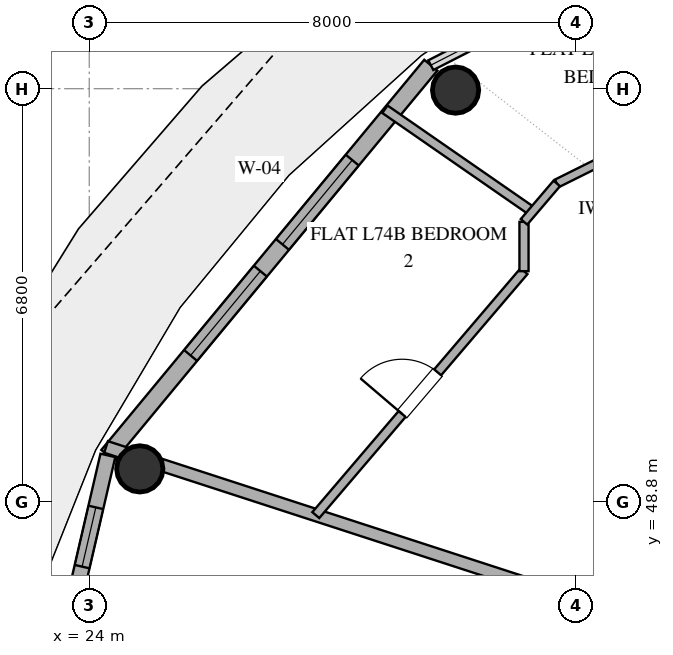
"""IFC4 building model, lengths in metres.
Left out: names, types, materials, properties, quantities, classifications, styles, units other than length and angle.
Written with IfcOpenShell. Run it as: python <this file> out.ifc"""

import sys

from ifc_helpers import new_model, si_unit, direction, frame, frame_2d, origin, origin_2d, place, context, subcontext, project, spatial, rectangle, hollow_circle, extrude, element, fill, save


model = new_model("IFC4")
c1 = context("Model", 3, precision=1e-05, world=origin(), true_north=direction((0.0, 1.0)))
c2 = subcontext(c1, "Body", "Model", "MODEL_VIEW")
j1 = project(units=[si_unit("LENGTHUNIT", "METRE"), si_unit("PLANEANGLEUNIT", "RADIAN")], contexts=[c1])
p1 = place(None, origin())
s1 = spatial("IfcSite", under=j1, at=p1, CompositionType="ELEMENT")
p2 = place(p1, origin())
s2 = spatial("IfcBuilding", under=s1, at=p2, CompositionType="ELEMENT")
p3 = place(p2, frame((0.0, 0.0, 287.4)))
s3 = spatial("IfcBuildingStorey", under=s2, at=p3, CompositionType="ELEMENT", Elevation=287.4)
for number, where, z_axis, x_axis in (
    (1, (30.025, 55.576, 0.0), (0.0, 0.0, 1.0), (1.0, 0.0, 0.0)),
    (2, (24.831, 49.347, 0.0), (0.0, 0.0, 1.0), (1.0, 0.0, 0.0)),
):
    element("IfcColumn", number, at=place(p3, frame(where, z_axis=z_axis, x_axis=x_axis)), inside=s3, PredefinedType="COLUMN", context=c2, shape_type="SweptSolid", body=[
        extrude(hollow_circle(Radius=0.381, WallThickness=0.025, at=origin_2d()), origin(), (0.0, 0.0, 1.0), 3.37),
    ])
p4 = place(p3, frame((29.617, 55.987, 0.0), z_axis=(0.0, 0.0, 1.0), x_axis=(-0.63761509934, -0.770355103243, 0.0)))
e3 = element("IfcWall", 3, at=p4, inside=s3, PredefinedType="SOLIDWALL", context=c2, shape_type="SweptSolid", body=[
    extrude(rectangle(XDim=8.33, YDim=0.28, at=frame_2d((4.165, 0.0))), origin(), (0.0, 0.0, 1.0), 3.37),
])
p5 = place(p4, frame((2.026, 0.0, 0.85)))
e4 = element("IfcOpeningElement", 4, at=p5, cuts=e3, PredefinedType="OPENING", context=c2, shape_type="SweptSolid", body=[
    extrude(rectangle(XDim=1.8, YDim=2.2, at=frame_2d((0.9, 1.1))), frame((0.0, 0.15, 0.0), z_axis=(0.0, -1.0, 0.0), x_axis=(1.0, 0.0, 0.0)), (0.0, 0.0, 1.0), 0.3),
])
p6 = place(p4, frame((4.396, 0.0, 0.85)))
e5 = element("IfcOpeningElement", 5, at=p6, cuts=e3, PredefinedType="OPENING", context=c2, shape_type="SweptSolid", body=[
    extrude(rectangle(XDim=1.8, YDim=2.2, at=frame_2d((0.9, 1.1))), frame((0.0, 0.15, 0.0), z_axis=(0.0, -1.0, 0.0), x_axis=(1.0, 0.0, 0.0)), (0.0, 0.0, 1.0), 0.3),
])
p7 = place(p3, frame((24.306, 49.57, 0.0), z_axis=(0.0, 0.0, 1.0), x_axis=(-0.225635078214, -0.974211892495, 0.0)))
e6 = element("IfcWall", 6, at=p7, inside=s3, PredefinedType="SOLIDWALL", context=c2, shape_type="SweptSolid", body=[
    extrude(rectangle(XDim=7.77, YDim=0.25, at=frame_2d((3.885, 0.0))), origin(), (0.0, 0.0, 1.0), 3.37),
])
p8 = place(p7, frame((0.878, 0.0, 1.42)))
e7 = element("IfcOpeningElement", 7, at=p8, cuts=e6, PredefinedType="OPENING", context=c2, shape_type="SweptSolid", body=[
    extrude(rectangle(XDim=1.0, YDim=1.05, at=frame_2d((0.5, 0.525))), frame((0.0, 0.135, 0.0), z_axis=(0.0, -1.0, 0.0), x_axis=(1.0, 0.0, 0.0)), (0.0, 0.0, 1.0), 0.27),
])
p9 = place(p3, frame((24.276, 49.708, 0.0), z_axis=(0.0, 0.0, 1.0), x_axis=(0.951054334328, -0.309023709699, 0.0)))
e8 = element("IfcWall", 8, at=p9, inside=s3, PredefinedType="PARTITIONING", context=c2, shape_type="SweptSolid", body=[
    extrude(rectangle(XDim=11.065, YDim=0.2, at=frame_2d((5.533, 0.0))), origin(), (0.0, 0.0, 1.0), 2.73),
])
p10 = place(p3, frame((27.726, 48.587, 0.0), z_axis=(0.0, 0.0, 1.0), x_axis=(0.649196412447, 0.760620810961, 0.0)))
e9 = element("IfcWall", 9, at=p10, inside=s3, PredefinedType="PARTITIONING", context=c2, shape_type="SweptSolid", body=[
    extrude(rectangle(XDim=5.274, YDim=0.15, at=frame_2d((2.637, 0.0))), origin(), (0.0, 0.0, 1.0), 2.73),
])
p11 = place(p10, frame((2.187, 0.0, 0.0)))
e10 = element("IfcOpeningElement", 10, at=p11, cuts=e9, PredefinedType="OPENING", context=c2, shape_type="SweptSolid", body=[
    extrude(rectangle(XDim=0.9, YDim=2.1, at=frame_2d((0.45, 1.05))), frame((0.0, 0.085, 0.0), z_axis=(0.0, -1.0, 0.0), x_axis=(1.0, 0.0, 0.0)), (0.0, 0.0, 1.0), 0.17),
])
p12 = place(p3, frame((31.293, 53.578, 0.0), z_axis=(0.0, 0.0, 1.0), x_axis=(-0.821957300328, 0.569549116792, 0.0)))
e11 = element("IfcWall", 11, at=p12, inside=s3, PredefinedType="PARTITIONING", context=c2, shape_type="SweptSolid", body=[
    extrude(rectangle(XDim=2.957, YDim=0.15, at=frame_2d((1.479, 0.0))), origin(), (0.0, 0.0, 1.0), 2.73),
])
p13 = place(p3, frame((32.711, 54.55, 0.0), z_axis=(0.0, 0.0, 1.0), x_axis=(-0.895409226325, -0.445244109912, 0.0)))
e12 = element("IfcWall", 12, at=p13, inside=s3, PredefinedType="PARTITIONING", context=c2, shape_type="SweptSolid", body=[
    extrude(rectangle(XDim=1.141, YDim=0.14, at=frame_2d((0.571, 0.0))), origin(), (0.0, 0.0, 1.0), 2.73),
])
p14 = place(p3, frame((31.15, 52.599, 0.0), z_axis=(0.0, 0.0, 1.0), x_axis=(0.0, 1.0, 0.0)))
e13 = element("IfcWall", 13, at=p14, inside=s3, PredefinedType="PARTITIONING", context=c2, shape_type="SweptSolid", body=[
    extrude(rectangle(XDim=0.812, YDim=0.15, at=frame_2d((0.406, 0.0))), origin(), (0.0, 0.0, 1.0), 2.73),
])
p15 = place(p3, frame((31.689, 54.042, 0.0), z_axis=(0.0, 0.0, 1.0), x_axis=(-0.649191857323, -0.760624698774, 0.0)))
e14 = element("IfcWall", 14, at=p15, inside=s3, PredefinedType="PARTITIONING", context=c2, shape_type="SweptSolid", body=[
    extrude(rectangle(XDim=0.83, YDim=0.14, at=frame_2d((0.415, 0.0))), origin(), (0.0, 0.0, 1.0), 2.73),
])
p16 = place(p5, origin())
e15 = element("IfcWindow", 15, at=p16, inside=s3, PartitioningType="SINGLE_PANEL", PredefinedType="WINDOW", context=c2, shape_type="SweptSolid", body=[
    extrude(rectangle(XDim=1.8, YDim=2.2, at=frame_2d((0.9, 1.1))), frame((0.0, 0.03, 0.0), z_axis=(0.0, -1.0, 0.0), x_axis=(1.0, 0.0, 0.0)), (0.0, 0.0, 1.0), 0.06),
])
fill(e4, e15)
p17 = place(p6, origin())
e16 = element("IfcWindow", 16, at=p17, inside=s3, PartitioningType="SINGLE_PANEL", PredefinedType="WINDOW", context=c2, shape_type="SweptSolid", body=[
    extrude(rectangle(XDim=1.8, YDim=2.2, at=frame_2d((0.9, 1.1))), frame((0.0, 0.03, 0.0), z_axis=(0.0, -1.0, 0.0), x_axis=(1.0, 0.0, 0.0)), (0.0, 0.0, 1.0), 0.06),
])
fill(e5, e16)
p18 = place(p8, origin())
e17 = element("IfcWindow", 17, at=p18, inside=s3, PartitioningType="SINGLE_PANEL", PredefinedType="WINDOW", context=c2, shape_type="SweptSolid", body=[
    extrude(rectangle(XDim=1.0, YDim=1.05, at=frame_2d((0.5, 0.525))), frame((0.0, 0.03, 0.0), z_axis=(0.0, -1.0, 0.0), x_axis=(1.0, 0.0, 0.0)), (0.0, 0.0, 1.0), 0.06),
])
fill(e7, e17)
p19 = place(p11, origin())
e18 = element("IfcDoor", 18, at=p19, inside=s3, OperationType="SINGLE_SWING_LEFT", PredefinedType="DOOR", context=c2, shape_type="SweptSolid", body=[
    extrude(rectangle(XDim=0.9, YDim=2.1, at=frame_2d((0.45, 1.05))), frame((0.0, 0.025, 0.0), z_axis=(0.0, -1.0, 0.0), x_axis=(1.0, 0.0, 0.0)), (0.0, 0.0, 1.0), 0.05),
])
fill(e10, e18)
save(model, sys.argv[1])
